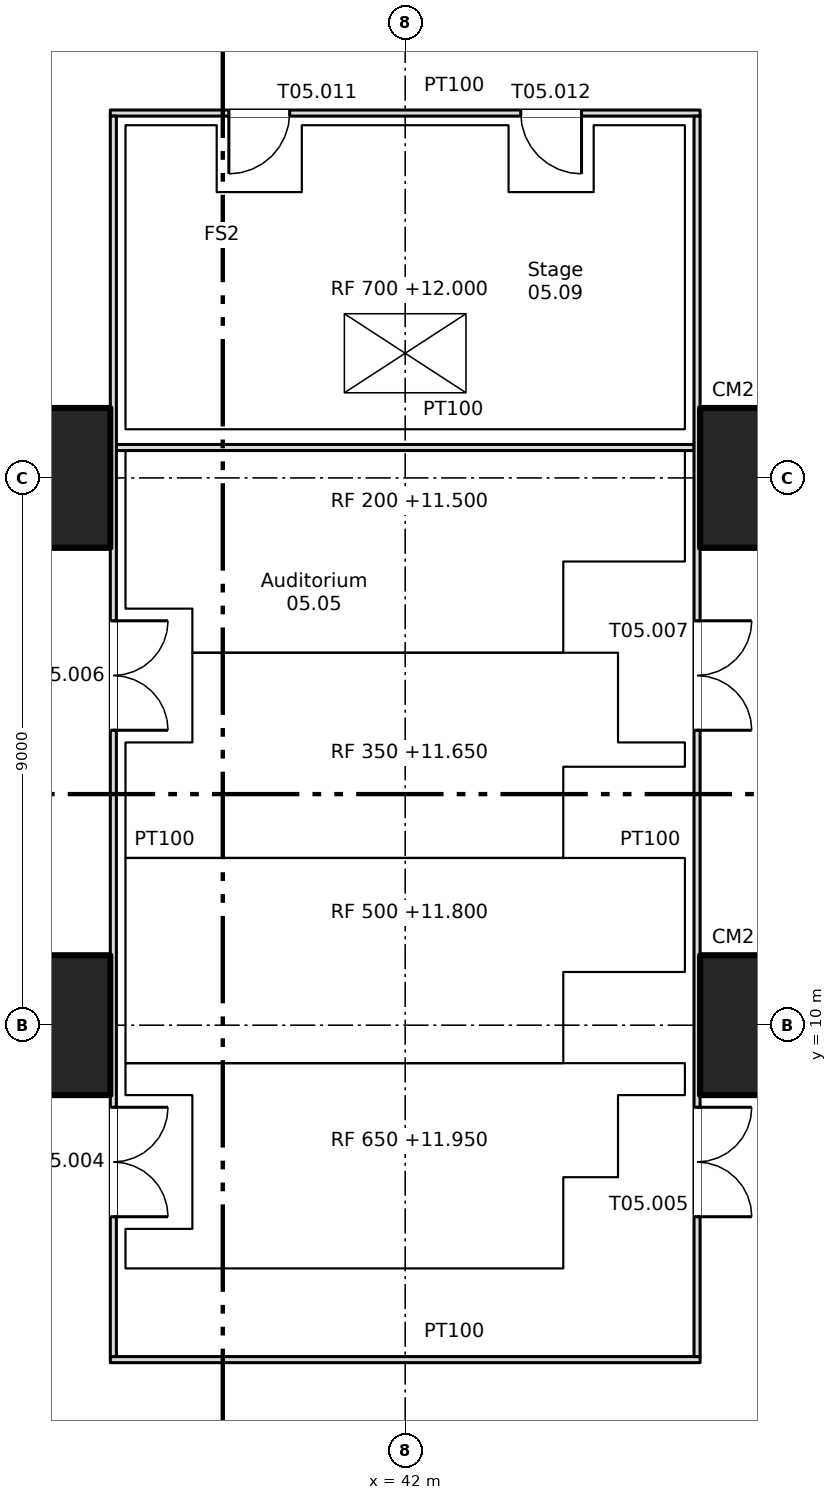
"""IFC4 building model, lengths in metres.
Left out: names, types, materials, properties, quantities, classifications, styles, units other than length and angle.
Written with IfcOpenShell. Run it as: python <this file> out.ifc"""

import sys

from ifc_helpers import new_model, si_unit, direction, frame, frame_2d, origin, origin_2d, place, context, subcontext, project, spatial, rectangle, extrude, element, fill, save


model = new_model("IFC4")
c1 = context("Model", 3, precision=1e-05, world=origin(), true_north=direction((0.0, 1.0)))
c2 = subcontext(c1, "Body", "Model", "MODEL_VIEW")
j1 = project(units=[si_unit("LENGTHUNIT", "METRE"), si_unit("PLANEANGLEUNIT", "RADIAN")], contexts=[c1])
p1 = place(None, origin())
s1 = spatial("IfcSite", under=j1, at=p1, CompositionType="ELEMENT")
p2 = place(p1, origin())
s2 = spatial("IfcBuilding", under=s1, at=p2, CompositionType="ELEMENT")
p3 = place(p2, frame((0.0, 0.0, 11.3)))
s3 = spatial("IfcBuildingStorey", under=s2, at=p3, CompositionType="ELEMENT", Elevation=11.3)
for number, where, z_axis, x_axis in (
    (1, (36.0, 10.0, 0.0), (0.0, 0.0, 1.0), (1.0, 0.0, 0.0)),
    (2, (36.0, 19.0, 0.0), (0.0, 0.0, 1.0), (1.0, 0.0, 0.0)),
    (3, (48.0, 10.0, 0.0), (0.0, 0.0, 1.0), (1.0, 0.0, 0.0)),
    (4, (48.0, 19.0, 0.0), (0.0, 0.0, 1.0), (1.0, 0.0, 0.0)),
):
    element("IfcColumn", number, at=place(p3, frame(where, z_axis=z_axis, x_axis=x_axis)), inside=s3, PredefinedType="COLUMN", context=c2, shape_type="SweptSolid", body=[
        extrude(rectangle(XDim=2.3, YDim=2.3, at=origin_2d()), origin(), (0.0, 0.0, 1.0), 6.1),
    ])
p4 = place(p3, frame((37.15, 4.5, 0.0), z_axis=(0.0, 0.0, 1.0), x_axis=(1.0, 0.0, 0.0)))
e5 = element("IfcWall", 5, at=p4, inside=s3, PredefinedType="PARTITIONING", context=c2, shape_type="SweptSolid", body=[
    extrude(rectangle(XDim=9.7, YDim=0.1, at=frame_2d((4.85, 0.0))), origin(), (0.0, 0.0, 1.0), 6.1),
])
p5 = place(p3, frame((37.25, 19.5, 0.0), z_axis=(0.0, 0.0, 1.0), x_axis=(1.0, 0.0, 0.0)))
e6 = element("IfcWall", 6, at=p5, inside=s3, PredefinedType="PARTITIONING", context=c2, shape_type="SweptSolid", body=[
    extrude(rectangle(XDim=9.5, YDim=0.1, at=frame_2d((4.75, 0.0))), origin(), (0.0, 0.0, 1.0), 6.1),
])
p6 = place(p3, frame((37.15, 25.0, 0.0), z_axis=(0.0, 0.0, 1.0), x_axis=(1.0, 0.0, 0.0)))
e7 = element("IfcWall", 7, at=p6, inside=s3, PredefinedType="PARTITIONING", context=c2, shape_type="SweptSolid", body=[
    extrude(rectangle(XDim=9.7, YDim=0.1, at=frame_2d((4.85, 0.0))), origin(), (0.0, 0.0, 1.0), 6.1),
])
p7 = place(p6, frame((1.95, 0.0, 0.0)))
e8 = element("IfcOpeningElement", 8, at=p7, cuts=e7, PredefinedType="OPENING", context=c2, shape_type="SweptSolid", body=[
    extrude(rectangle(XDim=1.0, YDim=2.1, at=frame_2d((0.5, 1.05))), frame((0.0, 0.06, 0.0), z_axis=(0.0, -1.0, 0.0), x_axis=(1.0, 0.0, 0.0)), (0.0, 0.0, 1.0), 0.12),
])
p8 = place(p6, frame((6.75, 0.0, 0.0)))
e9 = element("IfcOpeningElement", 9, at=p8, cuts=e7, PredefinedType="OPENING", context=c2, shape_type="SweptSolid", body=[
    extrude(rectangle(XDim=1.0, YDim=2.1, at=frame_2d((0.5, 1.05))), frame((0.0, 0.06, 0.0), z_axis=(0.0, -1.0, 0.0), x_axis=(1.0, 0.0, 0.0)), (0.0, 0.0, 1.0), 0.12),
])
p9 = place(p3, frame((37.2, 4.55, 0.0), z_axis=(0.0, 0.0, 1.0), x_axis=(0.0, 1.0, 0.0)))
e10 = element("IfcWall", 10, at=p9, inside=s3, PredefinedType="PARTITIONING", context=c2, shape_type="SweptSolid", body=[
    extrude(rectangle(XDim=20.4, YDim=0.1, at=frame_2d((10.2, 0.0))), origin(), (0.0, 0.0, 1.0), 6.1),
])
p10 = place(p9, frame((2.3, 0.0, 0.0)))
e11 = element("IfcOpeningElement", 11, at=p10, cuts=e10, PredefinedType="OPENING", context=c2, shape_type="SweptSolid", body=[
    extrude(rectangle(XDim=1.8, YDim=2.1, at=frame_2d((0.9, 1.05))), frame((0.0, 0.06, 0.0), z_axis=(0.0, -1.0, 0.0), x_axis=(1.0, 0.0, 0.0)), (0.0, 0.0, 1.0), 0.12),
])
p11 = place(p9, frame((10.3, 0.0, 0.0)))
e12 = element("IfcOpeningElement", 12, at=p11, cuts=e10, PredefinedType="OPENING", context=c2, shape_type="SweptSolid", body=[
    extrude(rectangle(XDim=1.8, YDim=2.1, at=frame_2d((0.9, 1.05))), frame((0.0, 0.06, 0.0), z_axis=(0.0, -1.0, 0.0), x_axis=(1.0, 0.0, 0.0)), (0.0, 0.0, 1.0), 0.12),
])
p12 = place(p3, frame((46.8, 4.55, 0.0), z_axis=(0.0, 0.0, 1.0), x_axis=(0.0, 1.0, 0.0)))
e13 = element("IfcWall", 13, at=p12, inside=s3, PredefinedType="PARTITIONING", context=c2, shape_type="SweptSolid", body=[
    extrude(rectangle(XDim=20.4, YDim=0.1, at=frame_2d((10.2, 0.0))), origin(), (0.0, 0.0, 1.0), 6.1),
])
p13 = place(p12, frame((2.3, 0.0, 0.0)))
e14 = element("IfcOpeningElement", 14, at=p13, cuts=e13, PredefinedType="OPENING", context=c2, shape_type="SweptSolid", body=[
    extrude(rectangle(XDim=1.8, YDim=2.1, at=frame_2d((0.9, 1.05))), frame((0.0, 0.06, 0.0), z_axis=(0.0, -1.0, 0.0), x_axis=(1.0, 0.0, 0.0)), (0.0, 0.0, 1.0), 0.12),
])
p14 = place(p12, frame((10.3, 0.0, 0.0)))
e15 = element("IfcOpeningElement", 15, at=p14, cuts=e13, PredefinedType="OPENING", context=c2, shape_type="SweptSolid", body=[
    extrude(rectangle(XDim=1.8, YDim=2.1, at=frame_2d((0.9, 1.05))), frame((0.0, 0.06, 0.0), z_axis=(0.0, -1.0, 0.0), x_axis=(1.0, 0.0, 0.0)), (0.0, 0.0, 1.0), 0.12),
])
p15 = place(p10, origin())
e16 = element("IfcDoor", 16, at=p15, inside=s3, OperationType="DOUBLE_DOOR_SINGLE_SWING", PredefinedType="DOOR", context=c2, shape_type="SweptSolid", body=[
    extrude(rectangle(XDim=1.8, YDim=2.1, at=frame_2d((0.9, 1.05))), frame((0.0, 0.025, 0.0), z_axis=(0.0, -1.0, 0.0), x_axis=(1.0, 0.0, 0.0)), (0.0, 0.0, 1.0), 0.05),
])
fill(e11, e16)
p16 = place(p13, origin())
e17 = element("IfcDoor", 17, at=p16, inside=s3, OperationType="DOUBLE_DOOR_SINGLE_SWING", PredefinedType="DOOR", context=c2, shape_type="SweptSolid", body=[
    extrude(rectangle(XDim=1.8, YDim=2.1, at=frame_2d((0.9, 1.05))), frame((0.0, 0.025, 0.0), z_axis=(0.0, -1.0, 0.0), x_axis=(1.0, 0.0, 0.0)), (0.0, 0.0, 1.0), 0.05),
])
fill(e14, e17)
p17 = place(p11, origin())
e18 = element("IfcDoor", 18, at=p17, inside=s3, OperationType="DOUBLE_DOOR_SINGLE_SWING", PredefinedType="DOOR", context=c2, shape_type="SweptSolid", body=[
    extrude(rectangle(XDim=1.8, YDim=2.1, at=frame_2d((0.9, 1.05))), frame((0.0, 0.025, 0.0), z_axis=(0.0, -1.0, 0.0), x_axis=(1.0, 0.0, 0.0)), (0.0, 0.0, 1.0), 0.05),
])
fill(e12, e18)
p18 = place(p14, origin())
e19 = element("IfcDoor", 19, at=p18, inside=s3, OperationType="DOUBLE_DOOR_SINGLE_SWING", PredefinedType="DOOR", context=c2, shape_type="SweptSolid", body=[
    extrude(rectangle(XDim=1.8, YDim=2.1, at=frame_2d((0.9, 1.05))), frame((0.0, 0.025, 0.0), z_axis=(0.0, -1.0, 0.0), x_axis=(1.0, 0.0, 0.0)), (0.0, 0.0, 1.0), 0.05),
])
fill(e15, e19)
p19 = place(p7, origin())
e20 = element("IfcDoor", 20, at=p19, inside=s3, OperationType="SINGLE_SWING_LEFT", PredefinedType="DOOR", context=c2, shape_type="SweptSolid", body=[
    extrude(rectangle(XDim=1.0, YDim=2.1, at=frame_2d((0.5, 1.05))), frame((0.0, 0.025, 0.0), z_axis=(0.0, -1.0, 0.0), x_axis=(1.0, 0.0, 0.0)), (0.0, 0.0, 1.0), 0.05),
])
fill(e8, e20)
p20 = place(p8, origin())
e21 = element("IfcDoor", 21, at=p20, inside=s3, OperationType="SINGLE_SWING_RIGHT", PredefinedType="DOOR", context=c2, shape_type="SweptSolid", body=[
    extrude(rectangle(XDim=1.0, YDim=2.1, at=frame_2d((0.5, 1.05))), frame((0.0, 0.025, 0.0), z_axis=(0.0, -1.0, 0.0), x_axis=(1.0, 0.0, 0.0)), (0.0, 0.0, 1.0), 0.05),
])
fill(e9, e21)
save(model, sys.argv[1])
